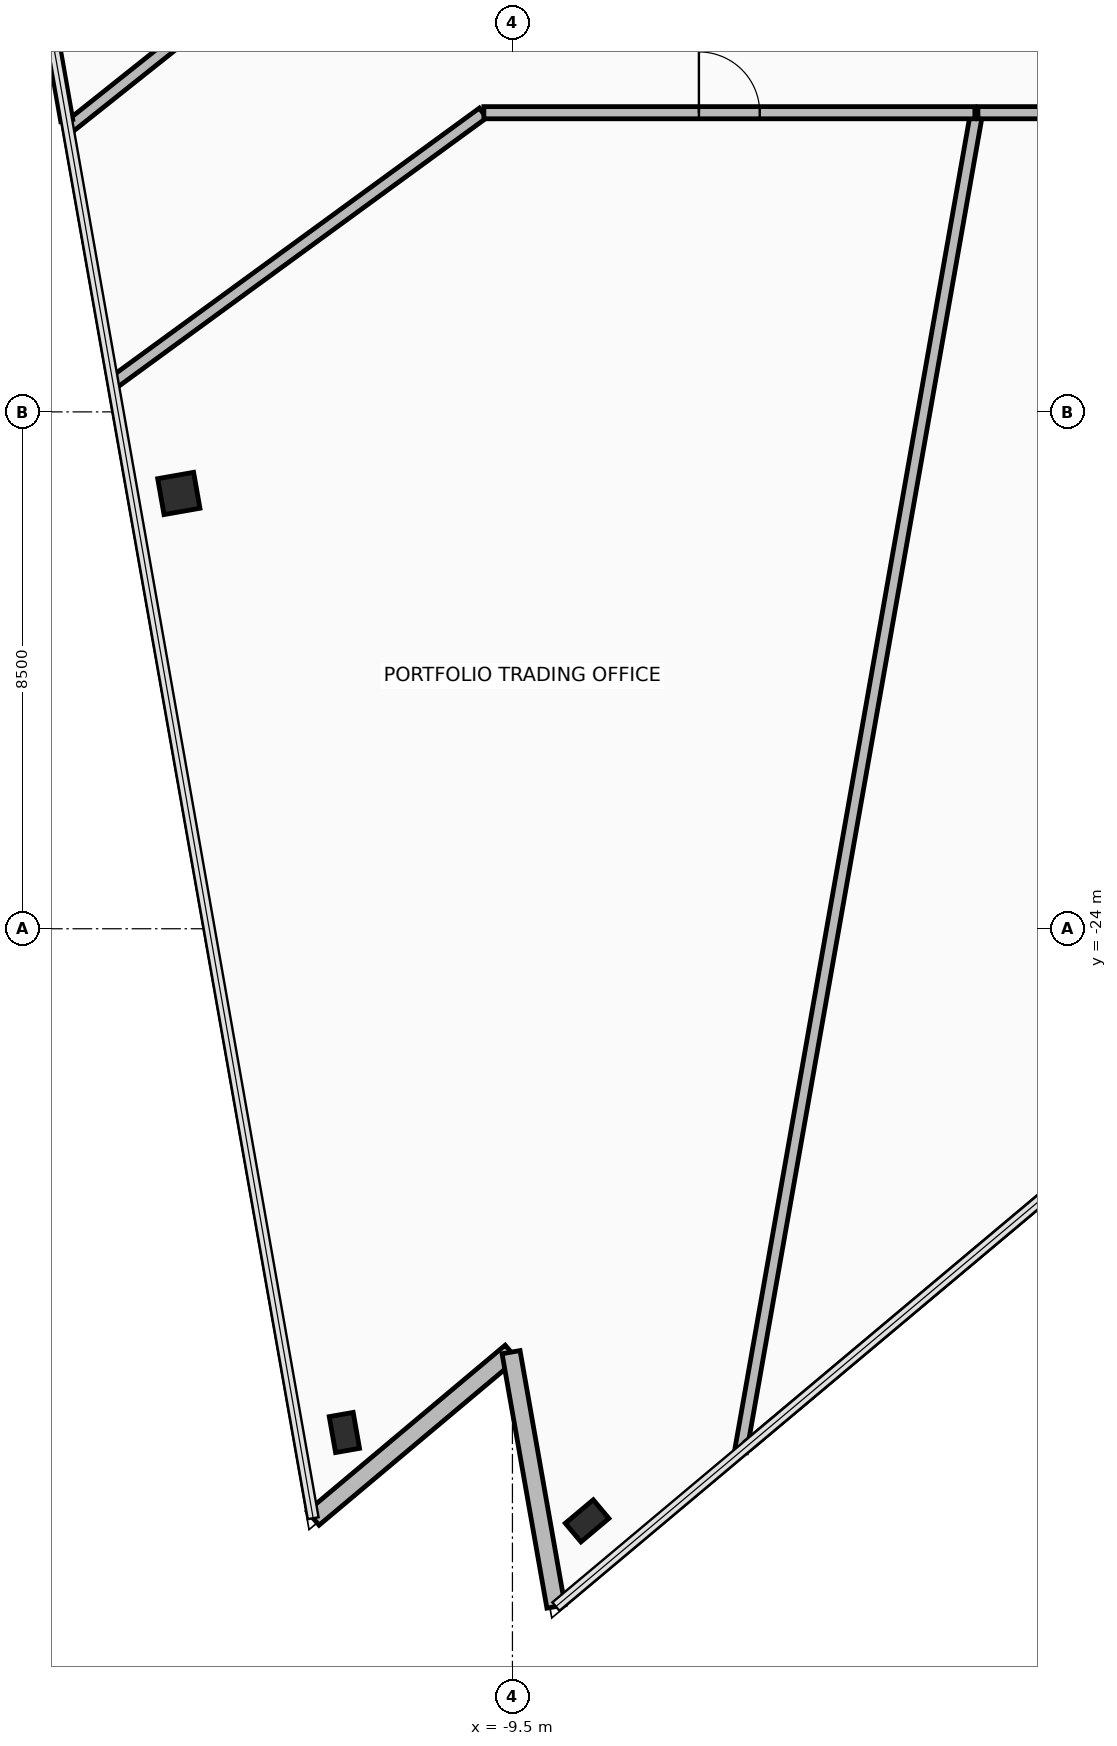
"""IFC4 building model, lengths in metres.
Left out: names, types, materials, properties, quantities, classifications, styles, units other than length and angle.
Written with IfcOpenShell. Run it as: python <this file> out.ifc"""

import sys

from ifc_helpers import new_model, si_unit, direction, frame, frame_2d, origin, origin_2d, place, context, subcontext, project, spatial, rectangle, hollow_rectangle, extrude, element, fill, save


model = new_model("IFC4")
c1 = context("Model", 3, precision=1e-05, world=origin(), true_north=direction((0.0, 1.0)))
c2 = subcontext(c1, "Body", "Model", "MODEL_VIEW")
j1 = project(units=[si_unit("LENGTHUNIT", "METRE"), si_unit("PLANEANGLEUNIT", "RADIAN")], contexts=[c1])
p1 = place(None, origin())
s1 = spatial("IfcSite", under=j1, at=p1, CompositionType="ELEMENT")
p2 = place(p1, origin())
s2 = spatial("IfcBuilding", under=s1, at=p2, CompositionType="ELEMENT")
p3 = place(p2, frame((0.0, 0.0, 181.3)))
s3 = spatial("IfcBuildingStorey", under=s2, at=p3, CompositionType="ELEMENT", Elevation=181.3)
p4 = place(p3, frame((-14.987, -16.842, 0.0), z_axis=(0.0, 0.0, 1.0), x_axis=(-0.173648177667, 0.984807753012, 0.0)))
e1 = element("IfcColumn", 1, at=p4, inside=s3, PredefinedType="COLUMN", context=c2, shape_type="SweptSolid", body=[
    extrude(hollow_rectangle(XDim=0.6, YDim=0.6, WallThickness=0.036, at=origin_2d()), origin(), (0.0, 0.0, 1.0), 3.6),
])
for number, where, z_axis, x_axis in (
    (2, (-12.264, -32.284, 0.0), (0.0, 0.0, 1.0), (-0.174, 0.985, 0.0)),
    (3, (-8.272, -33.737, 0.0), (0.0, 0.0, 1.0), (0.766, 0.643, 0.0)),
):
    element("IfcColumn", number, at=place(p3, frame(where, z_axis=z_axis, x_axis=x_axis)), inside=s3, PredefinedType="COLUMN", context=c2, shape_type="SweptSolid", body=[
        extrude(hollow_rectangle(XDim=0.4, YDim=0.6, WallThickness=0.03, at=origin_2d()), origin(), (0.0, 0.0, 1.0), 3.6),
    ])
for number, where, z_axis, x_axis in (
    (4, (-12.777, -33.694, 0.0), (0.0, 0.0, 1.0), (0.766, 0.643, 0.0)),
    (5, (-9.523, -30.963, 0.0), (0.0, 0.0, 1.0), (0.174, -0.985, 0.0)),
):
    element("IfcWall", number, at=place(p3, frame(where, z_axis=z_axis, x_axis=x_axis)), inside=s3, PredefinedType="STANDARD", context=c2, shape_type="SweptSolid", body=[
        extrude(rectangle(XDim=4.248, YDim=0.3, at=frame_2d((2.124, 0.0))), origin(), (0.0, 0.0, 1.0), 2.715),
    ])
p5 = place(p3, frame((-11.889, -6.911, 0.0), z_axis=(0.0, 0.0, 1.0), x_axis=(-0.782381746657, -0.622799167066, 0.0)))
e6 = element("IfcWall", 6, at=p5, inside=s3, PredefinedType="PARTITIONING", context=c2, shape_type="SweptSolid", body=[
    extrude(rectangle(XDim=6.288, YDim=0.2, at=frame_2d((3.144, 0.0))), origin(), (0.0, 0.0, 1.0), 2.715),
])
p6 = place(p3, frame((-16.83, -10.709, 0.0), z_axis=(0.0, 0.0, 1.0), x_axis=(-0.173641964803, 0.984808848487, 0.0)))
e7 = element("IfcWall", 7, at=p6, inside=s3, PredefinedType="PARTITIONING", context=c2, shape_type="SweptSolid", body=[
    extrude(rectangle(XDim=13.503, YDim=0.2, at=frame_2d((6.751, 0.0))), origin(), (0.0, 0.0, 1.0), 3.42),
])
p7 = place(p3, frame((-5.748, -32.598, 0.0), z_axis=(0.0, 0.0, 1.0), x_axis=(0.17364192413, 0.984808855659, 0.0)))
e8 = element("IfcWall", 8, at=p7, inside=s3, PredefinedType="PARTITIONING", context=c2, shape_type="SweptSolid", body=[
    extrude(rectangle(XDim=22.337, YDim=0.2, at=frame_2d((11.168, 0.0))), origin(), (0.0, 0.0, 1.0), 2.715),
])
p8 = place(p3, frame((-1.844, -10.58, 0.0), z_axis=(0.0, 0.0, 1.0), x_axis=(1.0, 0.0, 0.0)))
e9 = element("IfcWall", 9, at=p8, inside=s3, PredefinedType="PARTITIONING", context=c2, shape_type="SweptSolid", body=[
    extrude(rectangle(XDim=8.968, YDim=0.2, at=frame_2d((4.484, 0.0))), origin(), (0.0, 0.0, 1.0), 3.42),
])
p9 = place(p8, frame((4.059, 0.0, 0.0)))
e10 = element("IfcOpeningElement", 10, at=p9, cuts=e9, PredefinedType="OPENING", context=c2, shape_type="SweptSolid", body=[
    extrude(rectangle(XDim=0.85, YDim=2.1, at=frame_2d((0.425, 1.05))), frame((0.0, 0.11, 0.0), z_axis=(0.0, -1.0, 0.0), x_axis=(1.0, 0.0, 0.0)), (0.0, 0.0, 1.0), 0.22),
])
p10 = place(p3, frame((11.946, -17.751, 0.0), z_axis=(0.0, 0.0, 1.0), x_axis=(-0.76604510754, -0.64278681786, 0.0)))
e11 = element("IfcWall", 11, at=p10, inside=s3, PredefinedType="PARTITIONING", context=c2, shape_type="SweptSolid", body=[
    extrude(rectangle(XDim=22.935, YDim=0.15, at=frame_2d((11.467, 0.0))), origin(), (0.0, 0.0, 1.0), 3.42),
])
p11 = place(p3, frame((-16.069, -15.024, 0.0), z_axis=(0.0, 0.0, 1.0), x_axis=(0.807835167635, 0.589408467815, 0.0)))
e12 = element("IfcWall", 12, at=p11, inside=s3, PredefinedType="PARTITIONING", context=c2, shape_type="SweptSolid", body=[
    extrude(rectangle(XDim=7.531, YDim=0.2, at=frame_2d((3.766, 0.0))), origin(), (0.0, 0.0, 1.0), 2.715),
])
p12 = place(p3, frame((-9.97, -10.58, 0.0), z_axis=(0.0, 0.0, 1.0), x_axis=(1.0, 0.0, 0.0)))
e13 = element("IfcWall", 13, at=p12, inside=s3, PredefinedType="PARTITIONING", context=c2, shape_type="SweptSolid", body=[
    extrude(rectangle(XDim=8.075, YDim=0.2, at=frame_2d((4.037, 0.0))), origin(), (0.0, 0.0, 1.0), 2.865),
])
p13 = place(p12, frame((3.537, 0.0, 0.0)))
e14 = element("IfcOpeningElement", 14, at=p13, cuts=e13, PredefinedType="OPENING", context=c2, shape_type="SweptSolid", body=[
    extrude(rectangle(XDim=1.0, YDim=2.15, at=frame_2d((0.5, 1.075))), frame((0.0, 0.11, 0.0), z_axis=(0.0, -1.0, 0.0), x_axis=(1.0, 0.0, 0.0)), (0.0, 0.0, 1.0), 0.22),
])
p14 = place(p13, origin())
e15 = element("IfcDoor", 15, at=p14, inside=s3, OperationType="SINGLE_SWING_RIGHT", PredefinedType="DOOR", context=c2, shape_type="SweptSolid", body=[
    extrude(rectangle(XDim=1.0, YDim=2.15, at=frame_2d((0.5, 1.075))), frame((0.0, 0.025, 0.0), z_axis=(0.0, -1.0, 0.0), x_axis=(1.0, 0.0, 0.0)), (0.0, 0.0, 1.0), 0.05),
])
fill(e14, e15)
save(model, sys.argv[1])
